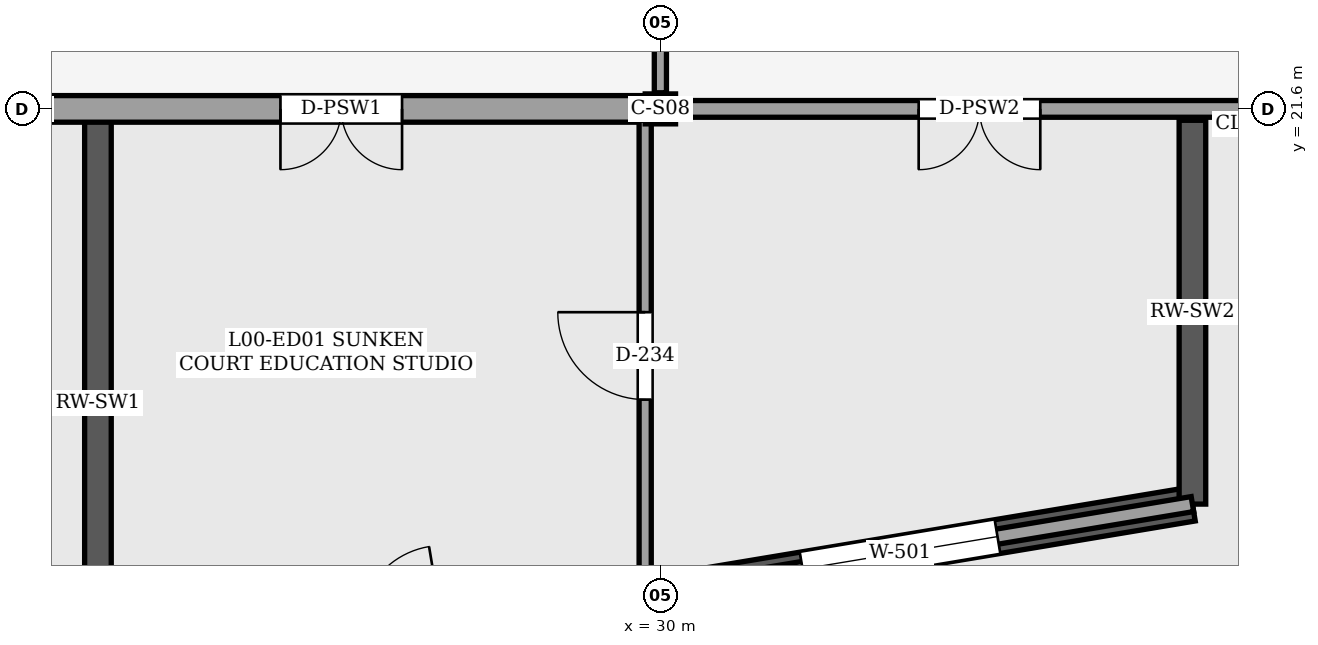
"""IFC4 building model, lengths in metres.
Left out: names, types, materials, properties, quantities, classifications, styles, units other than length and angle.
Written with IfcOpenShell. Run it as: python <this file> out.ifc"""

import sys

from ifc_helpers import new_model, si_unit, direction, frame, frame_2d, origin, origin_2d, place, context, subcontext, project, spatial, rectangle, i_section, extrude, element, fill, save


model = new_model("IFC4")
c1 = context("Model", 3, precision=1e-05, world=origin(), true_north=direction((0.0, 1.0)))
c2 = subcontext(c1, "Body", "Model", "MODEL_VIEW")
j1 = project(units=[si_unit("LENGTHUNIT", "METRE"), si_unit("PLANEANGLEUNIT", "RADIAN")], contexts=[c1])
p1 = place(None, origin())
s1 = spatial("IfcSite", under=j1, at=p1, CompositionType="ELEMENT")
p2 = place(p1, origin())
s2 = spatial("IfcBuilding", under=s1, at=p2, CompositionType="ELEMENT")
p3 = place(p2, origin())
s3 = spatial("IfcBuildingStorey", under=s2, at=p3, CompositionType="ELEMENT", Elevation=0.0)
p4 = place(p3, frame((30.0, 21.6, 0.0), z_axis=(0.0, 0.0, 1.0), x_axis=(1.0, 0.0, 0.0)))
e1 = element("IfcColumn", 1, at=p4, inside=s3, PredefinedType="COLUMN", context=c2, shape_type="SweptSolid", body=[
    extrude(i_section(OverallWidth=0.399, OverallDepth=0.394, WebThickness=0.023, FlangeThickness=0.037, FilletRadius=0.025, at=origin_2d()), origin(), (0.0, 0.0, 1.0), 5.4),
])
p5 = place(p3, frame((22.6, 14.0, 0.0), z_axis=(0.0, 0.0, 1.0), x_axis=(0.986394827799, 0.164393563414, 0.0)))
e2 = element("IfcWall", 2, at=p5, inside=s3, PredefinedType="USERDEFINED", context=c2, shape_type="SweptSolid", body=[
    extrude(rectangle(XDim=14.599, YDim=0.45, at=frame_2d((7.299, 0.0))), origin(), (0.0, 0.0, 1.0), 4.3),
])
p6 = place(p5, frame((2.4, 0.0, 0.0)))
e3 = element("IfcOpeningElement", 3, at=p6, cuts=e2, PredefinedType="OPENING", context=c2, shape_type="SweptSolid", body=[
    extrude(rectangle(XDim=2.2, YDim=2.4, at=frame_2d((1.1, 1.2))), frame((0.0, 0.235, 0.0), z_axis=(0.0, -1.0, 0.0), x_axis=(1.0, 0.0, 0.0)), (0.0, 0.0, 1.0), 0.47),
])
p7 = place(p5, frame((9.399, 0.0, 0.85)))
e4 = element("IfcOpeningElement", 4, at=p7, cuts=e2, PredefinedType="OPENING", context=c2, shape_type="SweptSolid", body=[
    extrude(rectangle(XDim=2.6, YDim=1.9, at=frame_2d((1.3, 0.95))), frame((0.0, 0.235, 0.0), z_axis=(0.0, -1.0, 0.0), x_axis=(1.0, 0.0, 0.0)), (0.0, 0.0, 1.0), 0.47),
])
p8 = place(p3, frame((22.6, 21.45, 0.0), z_axis=(0.0, 0.0, 1.0), x_axis=(0.0, -1.0, 0.0)))
e5 = element("IfcWall", 5, at=p8, inside=s3, PredefinedType="USERDEFINED", context=c2, shape_type="SweptSolid", body=[
    extrude(rectangle(XDim=7.45, YDim=0.35, at=frame_2d((3.725, 0.0))), origin(), (0.0, 0.0, 1.0), 4.3),
])
p9 = place(p3, frame((37.0, 16.4, 0.0), z_axis=(0.0, 0.0, 1.0), x_axis=(0.0, 1.0, 0.0)))
e6 = element("IfcWall", 6, at=p9, inside=s3, PredefinedType="USERDEFINED", context=c2, shape_type="SweptSolid", body=[
    extrude(rectangle(XDim=5.05, YDim=0.35, at=frame_2d((2.525, 0.0))), origin(), (0.0, 0.0, 1.0), 4.3),
])
p10 = place(p3, frame((22.6, 14.0, 4.5), z_axis=(0.0, 0.0, 1.0), x_axis=(0.986394827799, 0.164393563414, 0.0)))
e7 = element("IfcWall", 7, at=p10, inside=s3, PredefinedType="PARAPET", context=c2, shape_type="SweptSolid", body=[
    extrude(rectangle(XDim=14.599, YDim=0.2, at=frame_2d((7.299, 0.0))), origin(), (0.0, 0.0, 1.0), 0.65),
])
p11 = place(p3, frame((29.801, 21.6, 0.0), z_axis=(0.0, 0.0, 1.0), x_axis=(-1.0, 0.0, 0.0)))
e8 = element("IfcWall", 8, at=p11, inside=s3, PredefinedType="SOLIDWALL", context=c2, shape_type="SweptSolid", body=[
    extrude(rectangle(XDim=7.999, YDim=0.35, at=frame_2d((3.999, 0.0))), origin(), (0.0, 0.0, 1.0), 4.883),
])
p12 = place(p11, frame((3.199, 0.0, 0.0)))
e9 = element("IfcOpeningElement", 9, at=p12, cuts=e8, PredefinedType="OPENING", context=c2, shape_type="SweptSolid", body=[
    extrude(rectangle(XDim=1.6, YDim=2.25, at=frame_2d((0.8, 1.125))), frame((0.0, 0.185, 0.0), z_axis=(0.0, -1.0, 0.0), x_axis=(1.0, 0.0, 0.0)), (0.0, 0.0, 1.0), 0.371),
])
p13 = place(p3, frame((38.197, 21.6, 0.0), z_axis=(0.0, 0.0, 1.0), x_axis=(-1.0, 0.0, 0.0)))
e10 = element("IfcWall", 10, at=p13, inside=s3, PredefinedType="SOLIDWALL", context=c2, shape_type="SweptSolid", body=[
    extrude(rectangle(XDim=7.998, YDim=0.22, at=frame_2d((3.999, 0.0))), origin(), (0.0, 0.0, 1.0), 4.883),
])
p14 = place(p13, frame((3.199, 0.0, 0.0)))
e11 = element("IfcOpeningElement", 11, at=p14, cuts=e10, PredefinedType="OPENING", context=c2, shape_type="SweptSolid", body=[
    extrude(rectangle(XDim=1.6, YDim=2.25, at=frame_2d((0.8, 1.125))), frame((0.0, 0.12, 0.0), z_axis=(0.0, -1.0, 0.0), x_axis=(1.0, 0.0, 0.0)), (0.0, 0.0, 1.0), 0.24),
])
p15 = place(p3, frame((29.8, 15.25, 0.0), z_axis=(0.0, 0.0, 1.0), x_axis=(0.0, 1.0, 0.0)))
e12 = element("IfcWall", 12, at=p15, inside=s3, PredefinedType="PARTITIONING", context=c2, shape_type="SweptSolid", body=[
    extrude(rectangle(XDim=6.2, YDim=0.16, at=frame_2d((3.1, 0.0))), origin(), (0.0, 0.0, 1.0), 4.28),
])
p16 = place(p15, frame((2.525, 0.0, 0.0)))
e13 = element("IfcOpeningElement", 13, at=p16, cuts=e12, PredefinedType="OPENING", context=c2, shape_type="SweptSolid", body=[
    extrude(rectangle(XDim=1.15, YDim=2.2, at=frame_2d((0.575, 1.1))), frame((0.0, 0.09, 0.0), z_axis=(0.0, -1.0, 0.0), x_axis=(1.0, 0.0, 0.0)), (0.0, 0.0, 1.0), 0.18),
])
p17 = place(p3, frame((30.0, 21.812, 0.0), z_axis=(0.0, 0.0, 1.0), x_axis=(0.0, 1.0, 0.0)))
e14 = element("IfcWall", 14, at=p17, inside=s3, PredefinedType="PARTITIONING", context=c2, shape_type="SweptSolid", body=[
    extrude(rectangle(XDim=7.985, YDim=0.16, at=frame_2d((3.993, 0.0))), origin(), (0.0, 0.0, 1.0), 5.14),
])
p18 = place(p7, origin())
e15 = element("IfcWindow", 15, at=p18, inside=s3, PartitioningType="SINGLE_PANEL", PredefinedType="WINDOW", context=c2, shape_type="SweptSolid", body=[
    extrude(rectangle(XDim=2.6, YDim=1.9, at=frame_2d((1.3, 0.95))), frame((0.0, 0.03, 0.0), z_axis=(0.0, -1.0, 0.0), x_axis=(1.0, 0.0, 0.0)), (0.0, 0.0, 1.0), 0.06),
])
fill(e4, e15)
p19 = place(p12, origin())
e16 = element("IfcDoor", 16, at=p19, inside=s3, OperationType="DOUBLE_DOOR_SINGLE_SWING", PredefinedType="DOOR", context=c2, shape_type="SweptSolid", body=[
    extrude(rectangle(XDim=1.6, YDim=2.25, at=frame_2d((0.8, 1.125))), frame((0.0, 0.025, 0.0), z_axis=(0.0, -1.0, 0.0), x_axis=(1.0, 0.0, 0.0)), (0.0, 0.0, 1.0), 0.05),
])
fill(e9, e16)
p20 = place(p14, origin())
e17 = element("IfcDoor", 17, at=p20, inside=s3, OperationType="DOUBLE_DOOR_SINGLE_SWING", PredefinedType="DOOR", context=c2, shape_type="SweptSolid", body=[
    extrude(rectangle(XDim=1.6, YDim=2.25, at=frame_2d((0.8, 1.125))), frame((0.0, 0.025, 0.0), z_axis=(0.0, -1.0, 0.0), x_axis=(1.0, 0.0, 0.0)), (0.0, 0.0, 1.0), 0.05),
])
fill(e11, e17)
p21 = place(p16, origin())
e18 = element("IfcDoor", 18, at=p21, inside=s3, OperationType="SINGLE_SWING_RIGHT", PredefinedType="DOOR", context=c2, shape_type="SweptSolid", body=[
    extrude(rectangle(XDim=1.15, YDim=2.2, at=frame_2d((0.575, 1.1))), frame((0.0, 0.025, 0.0), z_axis=(0.0, -1.0, 0.0), x_axis=(1.0, 0.0, 0.0)), (0.0, 0.0, 1.0), 0.05),
])
fill(e13, e18)
save(model, sys.argv[1])
